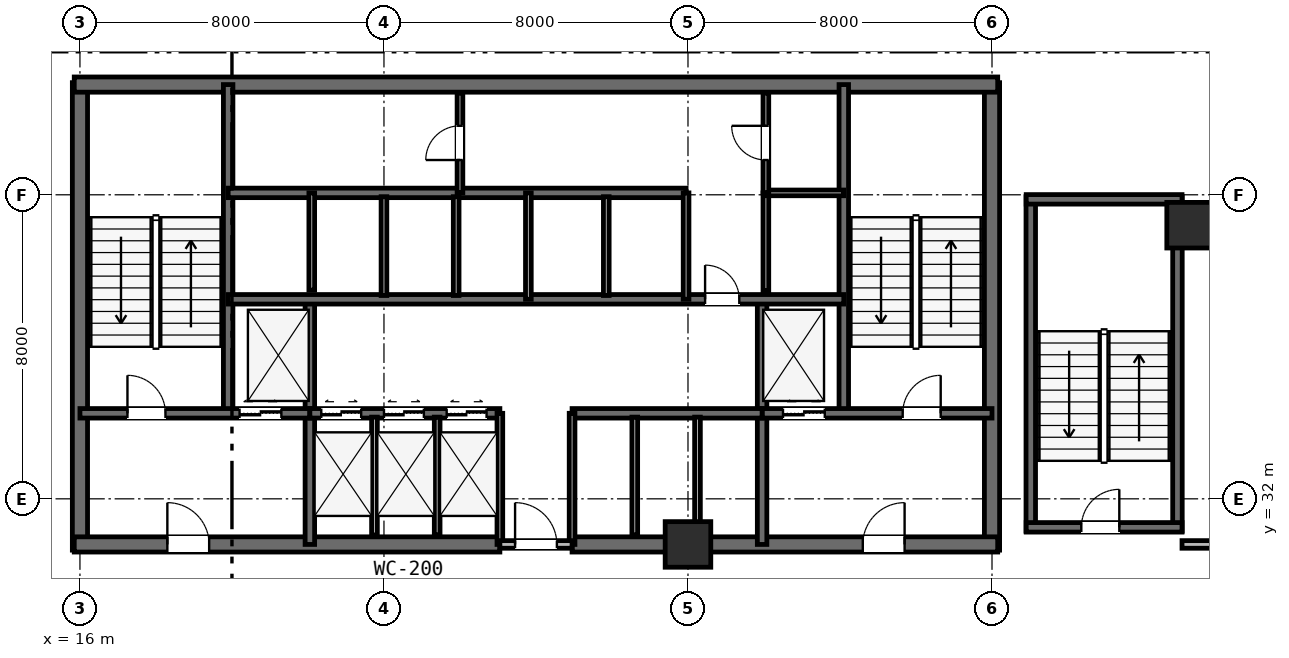
"""IFC4 building model, lengths in metres.
Left out: names, types, materials, properties, quantities, classifications, styles, units other than length and angle.
Written with IfcOpenShell. Run it as: python <this file> out.ifc"""

import sys

from ifc_helpers import new_model, si_unit, direction, frame, frame_2d, origin, origin_2d, place, context, subcontext, project, spatial, rectangle, extrude, element, fill, save


model = new_model("IFC4")
c1 = context("Model", 3, precision=1e-05, world=origin(), true_north=direction((0.0, 1.0)))
c2 = subcontext(c1, "Body", "Model", "MODEL_VIEW")
j1 = project(units=[si_unit("LENGTHUNIT", "METRE"), si_unit("PLANEANGLEUNIT", "RADIAN")], contexts=[c1])
p1 = place(None, origin())
s1 = spatial("IfcSite", under=j1, at=p1, CompositionType="ELEMENT")
p2 = place(p1, origin())
s2 = spatial("IfcBuilding", under=s1, at=p2, CompositionType="ELEMENT")
p3 = place(p2, frame((0.0, 0.0, -13.2)))
s3 = spatial("IfcBuildingStorey", under=s2, at=p3, CompositionType="ELEMENT", Elevation=-13.2)
for number, where, z_axis, x_axis in (
    (1, (16.0, 30.65, 0.0), (0.0, 0.0, 1.0), (0.0, 1.0, 0.0)),
    (2, (40.0, 30.65, 0.0), (0.0, 0.0, 1.0), (0.0, 1.0, 0.0)),
):
    element("IfcWall", number, at=place(p3, frame(where, z_axis=z_axis, x_axis=x_axis)), inside=s3, PredefinedType="SHEAR", context=c2, shape_type="SweptSolid", body=[
        extrude(rectangle(XDim=12.3, YDim=0.4, at=frame_2d((6.15, 0.0))), origin(), (0.0, 0.0, 1.0), 3.8),
    ])
p4 = place(p3, frame((15.85, 42.9, 0.0), z_axis=(0.0, 0.0, 1.0), x_axis=(1.0, 0.0, 0.0)))
e3 = element("IfcWall", 3, at=p4, inside=s3, PredefinedType="SHEAR", context=c2, shape_type="SweptSolid", body=[
    extrude(rectangle(XDim=24.3, YDim=0.4, at=frame_2d((12.15, 0.0))), origin(), (0.0, 0.0, 1.0), 3.8),
])
p5 = place(p3, frame((15.85, 30.8, 0.0), z_axis=(0.0, 0.0, 1.0), x_axis=(1.0, 0.0, 0.0)))
e4 = element("IfcWall", 4, at=p5, inside=s3, PredefinedType="SHEAR", context=c2, shape_type="SweptSolid", body=[
    extrude(rectangle(XDim=11.2, YDim=0.4, at=frame_2d((5.6, 0.0))), origin(), (0.0, 0.0, 1.0), 3.8),
])
p6 = place(p5, frame((2.45, 0.0, 0.0)))
e5 = element("IfcOpeningElement", 5, at=p6, cuts=e4, PredefinedType="OPENING", context=c2, shape_type="SweptSolid", body=[
    extrude(rectangle(XDim=1.1, YDim=2.15, at=frame_2d((0.55, 1.075))), frame((0.0, 0.21, 0.0), z_axis=(0.0, -1.0, 0.0), x_axis=(1.0, 0.0, 0.0)), (0.0, 0.0, 1.0), 0.42),
])
p7 = place(p3, frame((28.95, 30.8, 0.0), z_axis=(0.0, 0.0, 1.0), x_axis=(1.0, 0.0, 0.0)))
e6 = element("IfcWall", 6, at=p7, inside=s3, PredefinedType="SHEAR", context=c2, shape_type="SweptSolid", body=[
    extrude(rectangle(XDim=11.2, YDim=0.4, at=frame_2d((5.6, 0.0))), origin(), (0.0, 0.0, 1.0), 3.8),
])
p8 = place(p7, frame((7.65, 0.0, 0.0)))
e7 = element("IfcOpeningElement", 7, at=p8, cuts=e6, PredefinedType="OPENING", context=c2, shape_type="SweptSolid", body=[
    extrude(rectangle(XDim=1.1, YDim=2.15, at=frame_2d((0.55, 1.075))), frame((0.0, 0.21, 0.0), z_axis=(0.0, -1.0, 0.0), x_axis=(1.0, 0.0, 0.0)), (0.0, 0.0, 1.0), 0.42),
])
for number, where, z_axis, x_axis in (
    (8, (19.9, 34.25, 0.0), (0.0, 0.0, 1.0), (0.0, 1.0, 0.0)),
    (9, (36.1, 34.25, 0.0), (0.0, 0.0, 1.0), (0.0, 1.0, 0.0)),
):
    element("IfcWall", number, at=place(p3, frame(where, z_axis=z_axis, x_axis=x_axis)), inside=s3, PredefinedType="SHEAR", context=c2, shape_type="SweptSolid", body=[
        extrude(rectangle(XDim=8.65, YDim=0.25, at=frame_2d((4.325, 0.0))), origin(), (0.0, 0.0, 1.0), 3.8),
    ])
for number, where, z_axis, x_axis in (
    (10, (22.05, 30.8, 0.0), (0.0, 0.0, 1.0), (0.0, 1.0, 0.0)),
    (11, (33.95, 30.8, 0.0), (0.0, 0.0, 1.0), (0.0, 1.0, 0.0)),
):
    element("IfcWall", number, at=place(p3, frame(where, z_axis=z_axis, x_axis=x_axis)), inside=s3, PredefinedType="SHEAR", context=c2, shape_type="SweptSolid", body=[
        extrude(rectangle(XDim=6.45, YDim=0.25, at=frame_2d((3.225, 0.0))), origin(), (0.0, 0.0, 1.0), 3.8),
    ])
p9 = place(p3, frame((16.0, 34.25, 0.0), z_axis=(0.0, 0.0, 1.0), x_axis=(1.0, 0.0, 0.0)))
e12 = element("IfcWall", 12, at=p9, inside=s3, PredefinedType="SHEAR", context=c2, shape_type="SweptSolid", body=[
    extrude(rectangle(XDim=6.05, YDim=0.25, at=frame_2d((3.025, 0.0))), origin(), (0.0, 0.0, 1.0), 3.8),
])
p10 = place(p9, frame((1.25, 0.0, 0.0)))
e13 = element("IfcOpeningElement", 13, at=p10, cuts=e12, PredefinedType="OPENING", context=c2, shape_type="SweptSolid", body=[
    extrude(rectangle(XDim=1.0, YDim=2.15, at=frame_2d((0.5, 1.075))), frame((0.0, 0.135, 0.0), z_axis=(0.0, -1.0, 0.0), x_axis=(1.0, 0.0, 0.0)), (0.0, 0.0, 1.0), 0.27),
])
p11 = place(p9, frame((4.2, 0.0, 0.0)))
e14 = element("IfcOpeningElement", 14, at=p11, cuts=e12, PredefinedType="OPENING", context=c2, shape_type="SweptSolid", body=[
    extrude(rectangle(XDim=1.1, YDim=2.15, at=frame_2d((0.55, 1.075))), frame((0.0, 0.135, 0.0), z_axis=(0.0, -1.0, 0.0), x_axis=(1.0, 0.0, 0.0)), (0.0, 0.0, 1.0), 0.27),
])
p12 = place(p3, frame((33.95, 34.25, 0.0), z_axis=(0.0, 0.0, 1.0), x_axis=(1.0, 0.0, 0.0)))
e15 = element("IfcWall", 15, at=p12, inside=s3, PredefinedType="SHEAR", context=c2, shape_type="SweptSolid", body=[
    extrude(rectangle(XDim=6.05, YDim=0.25, at=frame_2d((3.025, 0.0))), origin(), (0.0, 0.0, 1.0), 3.8),
])
p13 = place(p12, frame((3.7, 0.0, 0.0)))
e16 = element("IfcOpeningElement", 16, at=p13, cuts=e15, PredefinedType="OPENING", context=c2, shape_type="SweptSolid", body=[
    extrude(rectangle(XDim=1.0, YDim=2.15, at=frame_2d((0.5, 1.075))), frame((0.0, 0.135, 0.0), z_axis=(0.0, -1.0, 0.0), x_axis=(1.0, 0.0, 0.0)), (0.0, 0.0, 1.0), 0.27),
])
p14 = place(p12, frame((0.55, 0.0, 0.0)))
e17 = element("IfcOpeningElement", 17, at=p14, cuts=e15, PredefinedType="OPENING", context=c2, shape_type="SweptSolid", body=[
    extrude(rectangle(XDim=1.1, YDim=2.15, at=frame_2d((0.55, 1.075))), frame((0.0, 0.135, 0.0), z_axis=(0.0, -1.0, 0.0), x_axis=(1.0, 0.0, 0.0)), (0.0, 0.0, 1.0), 0.27),
])
p15 = place(p3, frame((22.05, 34.25, 0.0), z_axis=(0.0, 0.0, 1.0), x_axis=(1.0, 0.0, 0.0)))
e18 = element("IfcWall", 18, at=p15, inside=s3, PredefinedType="SHEAR", context=c2, shape_type="SweptSolid", body=[
    extrude(rectangle(XDim=5.0, YDim=0.25, at=frame_2d((2.5, 0.0))), origin(), (0.0, 0.0, 1.0), 3.8),
])
p16 = place(p15, frame((0.3, 0.0, 0.0)))
e19 = element("IfcOpeningElement", 19, at=p16, cuts=e18, PredefinedType="OPENING", context=c2, shape_type="SweptSolid", body=[
    extrude(rectangle(XDim=1.05, YDim=2.15, at=frame_2d((0.525, 1.075))), frame((0.0, 0.135, 0.0), z_axis=(0.0, -1.0, 0.0), x_axis=(1.0, 0.0, 0.0)), (0.0, 0.0, 1.0), 0.27),
])
p17 = place(p15, frame((1.95, 0.0, 0.0)))
e20 = element("IfcOpeningElement", 20, at=p17, cuts=e18, PredefinedType="OPENING", context=c2, shape_type="SweptSolid", body=[
    extrude(rectangle(XDim=1.05, YDim=2.15, at=frame_2d((0.525, 1.075))), frame((0.0, 0.135, 0.0), z_axis=(0.0, -1.0, 0.0), x_axis=(1.0, 0.0, 0.0)), (0.0, 0.0, 1.0), 0.27),
])
p18 = place(p15, frame((3.6, 0.0, 0.0)))
e21 = element("IfcOpeningElement", 21, at=p18, cuts=e18, PredefinedType="OPENING", context=c2, shape_type="SweptSolid", body=[
    extrude(rectangle(XDim=1.05, YDim=2.15, at=frame_2d((0.525, 1.075))), frame((0.0, 0.135, 0.0), z_axis=(0.0, -1.0, 0.0), x_axis=(1.0, 0.0, 0.0)), (0.0, 0.0, 1.0), 0.27),
])
p19 = place(p3, frame((28.95, 34.25, 0.0), z_axis=(0.0, 0.0, 1.0), x_axis=(1.0, 0.0, 0.0)))
e22 = element("IfcWall", 22, at=p19, inside=s3, PredefinedType="SHEAR", context=c2, shape_type="SweptSolid", body=[
    extrude(rectangle(XDim=5.0, YDim=0.25, at=frame_2d((2.5, 0.0))), origin(), (0.0, 0.0, 1.0), 3.8),
])
p20 = place(p3, frame((19.9, 37.25, 0.0), z_axis=(0.0, 0.0, 1.0), x_axis=(1.0, 0.0, 0.0)))
e23 = element("IfcWall", 23, at=p20, inside=s3, PredefinedType="SHEAR", context=c2, shape_type="SweptSolid", body=[
    extrude(rectangle(XDim=16.2, YDim=0.25, at=frame_2d((8.1, 0.0))), origin(), (0.0, 0.0, 1.0), 3.8),
])
p21 = place(p20, frame((12.55, 0.0, 0.0)))
e24 = element("IfcOpeningElement", 24, at=p21, cuts=e23, PredefinedType="OPENING", context=c2, shape_type="SweptSolid", body=[
    extrude(rectangle(XDim=0.9, YDim=2.15, at=frame_2d((0.45, 1.075))), frame((0.0, 0.135, 0.0), z_axis=(0.0, -1.0, 0.0), x_axis=(1.0, 0.0, 0.0)), (0.0, 0.0, 1.0), 0.27),
])
p22 = place(p3, frame((19.9, 40.05, 0.0), z_axis=(0.0, 0.0, 1.0), x_axis=(1.0, 0.0, 0.0)))
e25 = element("IfcWall", 25, at=p22, inside=s3, PredefinedType="SHEAR", context=c2, shape_type="SweptSolid", body=[
    extrude(rectangle(XDim=12.05, YDim=0.25, at=frame_2d((6.025, 0.0))), origin(), (0.0, 0.0, 1.0), 3.8),
])
for number, where, z_axis, x_axis in (
    (26, (41.02, 31.15, 0.0), (0.0, 0.0, 1.0), (0.0, 1.0, 0.0)),
    (27, (44.88, 31.15, 0.0), (0.0, 0.0, 1.0), (0.0, 1.0, 0.0)),
):
    element("IfcWall", number, at=place(p3, frame(where, z_axis=z_axis, x_axis=x_axis)), inside=s3, PredefinedType="SHEAR", context=c2, shape_type="SweptSolid", body=[
        extrude(rectangle(XDim=8.8, YDim=0.25, at=frame_2d((4.4, 0.0))), origin(), (0.0, 0.0, 1.0), 3.8),
    ])
p23 = place(p3, frame((40.9, 39.88, 0.0), z_axis=(0.0, 0.0, 1.0), x_axis=(1.0, 0.0, 0.0)))
e28 = element("IfcWall", 28, at=p23, inside=s3, PredefinedType="SHEAR", context=c2, shape_type="SweptSolid", body=[
    extrude(rectangle(XDim=4.1, YDim=0.25, at=frame_2d((2.05, 0.0))), origin(), (0.0, 0.0, 1.0), 3.8),
])
p24 = place(p3, frame((40.9, 31.25, 0.0), z_axis=(0.0, 0.0, 1.0), x_axis=(1.0, 0.0, 0.0)))
e29 = element("IfcWall", 29, at=p24, inside=s3, PredefinedType="SHEAR", context=c2, shape_type="SweptSolid", body=[
    extrude(rectangle(XDim=4.1, YDim=0.25, at=frame_2d((2.05, 0.0))), origin(), (0.0, 0.0, 1.0), 3.8),
])
p25 = place(p24, frame((1.45, 0.0, 0.0)))
e30 = element("IfcOpeningElement", 30, at=p25, cuts=e29, PredefinedType="OPENING", context=c2, shape_type="SweptSolid", body=[
    extrude(rectangle(XDim=1.0, YDim=2.15, at=frame_2d((0.5, 1.075))), frame((0.0, 0.135, 0.0), z_axis=(0.0, -1.0, 0.0), x_axis=(1.0, 0.0, 0.0)), (0.0, 0.0, 1.0), 0.27),
])
for number, where, z_axis, x_axis in (
    (31, (45.2, 39.2, 0.0), (0.0, 0.0, 1.0), (1.0, 0.0, 0.0)),
    (32, (32.0, 30.8, 0.0), (0.0, 0.0, 1.0), (1.0, 0.0, 0.0)),
):
    element("IfcColumn", number, at=place(p3, frame(where, z_axis=z_axis, x_axis=x_axis)), inside=s3, PredefinedType="COLUMN", context=c2, shape_type="SweptSolid", body=[
        extrude(rectangle(XDim=1.2, YDim=1.2, at=origin_2d()), origin(), (0.0, 0.0, 1.0), 3.8),
    ])
for number, where, z_axis, x_axis in (
    (33, (27.05, 30.8, 0.0), (0.0, 0.0, 1.0), (0.0, 1.0, 0.0)),
    (34, (28.95, 30.8, 0.0), (0.0, 0.0, 1.0), (0.0, 1.0, 0.0)),
):
    element("IfcWall", number, at=place(p3, frame(where, z_axis=z_axis, x_axis=x_axis)), inside=s3, PredefinedType="PLUMBINGWALL", context=c2, shape_type="SweptSolid", body=[
        extrude(rectangle(XDim=3.45, YDim=0.15, at=frame_2d((1.725, 0.0))), origin(), (0.0, 0.0, 1.0), 3.49),
    ])
p26 = place(p3, frame((27.05, 30.8, 0.0), z_axis=(0.0, 0.0, 1.0), x_axis=(1.0, 0.0, 0.0)))
e35 = element("IfcWall", 35, at=p26, inside=s3, PredefinedType="PARTITIONING", context=c2, shape_type="SweptSolid", body=[
    extrude(rectangle(XDim=1.9, YDim=0.2, at=frame_2d((0.95, 0.0))), origin(), (0.0, 0.0, 1.0), 3.49),
])
p27 = place(p26, frame((0.4, 0.0, 0.0)))
e36 = element("IfcOpeningElement", 36, at=p27, cuts=e35, PredefinedType="OPENING", context=c2, shape_type="SweptSolid", body=[
    extrude(rectangle(XDim=1.1, YDim=2.15, at=frame_2d((0.55, 1.075))), frame((0.0, 0.11, 0.0), z_axis=(0.0, -1.0, 0.0), x_axis=(1.0, 0.0, 0.0)), (0.0, 0.0, 1.0), 0.22),
])
for number, where, z_axis, x_axis in (
    (37, (23.75, 31.05, 0.0), (0.0, 0.0, 1.0), (0.0, 1.0, 0.0)),
    (38, (25.4, 31.05, 0.0), (0.0, 0.0, 1.0), (0.0, 1.0, 0.0)),
    (39, (30.6, 31.05, 0.0), (0.0, 0.0, 1.0), (0.0, 1.0, 0.0)),
):
    element("IfcWall", number, at=place(p3, frame(where, z_axis=z_axis, x_axis=x_axis)), inside=s3, PredefinedType="PLUMBINGWALL", context=c2, shape_type="SweptSolid", body=[
        extrude(rectangle(XDim=3.1, YDim=0.15, at=frame_2d((1.55, 0.0))), origin(), (0.0, 0.0, 1.0), 3.49),
    ])
p28 = place(p3, frame((32.25, 31.05, 0.0), z_axis=(0.0, 0.0, 1.0), x_axis=(0.0, 1.0, 0.0)))
e40 = element("IfcWall", 40, at=p28, inside=s3, PredefinedType="PLUMBINGWALL", context=c2, shape_type="SweptSolid", body=[
    extrude(rectangle(XDim=3.1, YDim=0.15, at=frame_2d((1.55, 0.0))), origin(), (0.0, 0.0, 1.0), 2.88),
])
p29 = place(p3, frame((22.1, 37.49, 0.0), z_axis=(0.0, 0.0, 1.0), x_axis=(0.0, 1.0, 0.0)))
e41 = element("IfcWall", 41, at=p29, inside=s3, PredefinedType="PLUMBINGWALL", context=c2, shape_type="SweptSolid", body=[
    extrude(rectangle(XDim=2.56, YDim=0.15, at=frame_2d((1.28, 0.0))), origin(), (0.0, 0.0, 1.0), 3.49),
])
p30 = place(p3, frame((27.8, 37.25, 0.0), z_axis=(0.0, 0.0, 1.0), x_axis=(0.0, 1.0, 0.0)))
e42 = element("IfcWall", 42, at=p30, inside=s3, PredefinedType="PLUMBINGWALL", context=c2, shape_type="SweptSolid", body=[
    extrude(rectangle(XDim=2.8, YDim=0.15, at=frame_2d((1.4, 0.0))), origin(), (0.0, 0.0, 1.0), 3.49),
])
for number, where, z_axis, x_axis in (
    (43, (24.0, 37.35, 0.0), (0.0, 0.0, 1.0), (0.0, 1.0, 0.0)),
    (44, (25.9, 37.35, 0.0), (0.0, 0.0, 1.0), (0.0, 1.0, 0.0)),
):
    element("IfcWall", number, at=place(p3, frame(where, z_axis=z_axis, x_axis=x_axis)), inside=s3, PredefinedType="PLUMBINGWALL", context=c2, shape_type="SweptSolid", body=[
        extrude(rectangle(XDim=2.6, YDim=0.15, at=frame_2d((1.3, 0.0))), origin(), (0.0, 0.0, 1.0), 3.49),
    ])
p31 = place(p3, frame((31.95, 37.25, 0.0), z_axis=(0.0, 0.0, 1.0), x_axis=(0.0, 1.0, 0.0)))
e45 = element("IfcWall", 45, at=p31, inside=s3, PredefinedType="PLUMBINGWALL", context=c2, shape_type="SweptSolid", body=[
    extrude(rectangle(XDim=2.8, YDim=0.15, at=frame_2d((1.4, 0.0))), origin(), (0.0, 0.0, 1.0), 3.49),
])
p32 = place(p3, frame((29.85, 37.35, 0.0), z_axis=(0.0, 0.0, 1.0), x_axis=(0.0, 1.0, 0.0)))
e46 = element("IfcWall", 46, at=p32, inside=s3, PredefinedType="PLUMBINGWALL", context=c2, shape_type="SweptSolid", body=[
    extrude(rectangle(XDim=2.6, YDim=0.15, at=frame_2d((1.3, 0.0))), origin(), (0.0, 0.0, 1.0), 3.49),
])
p33 = place(p3, frame((34.05, 37.473, 0.0), z_axis=(0.0, 0.0, 1.0), x_axis=(0.0, 1.0, 0.0)))
e47 = element("IfcWall", 47, at=p33, inside=s3, PredefinedType="PLUMBINGWALL", context=c2, shape_type="SweptSolid", body=[
    extrude(rectangle(XDim=2.577, YDim=0.15, at=frame_2d((1.288, 0.0))), origin(), (0.0, 0.0, 1.0), 3.49),
])
p34 = place(p3, frame((34.05, 40.05, 0.0), z_axis=(0.0, 0.0, 1.0), x_axis=(1.0, 0.0, 0.0)))
e48 = element("IfcWall", 48, at=p34, inside=s3, PredefinedType="PARTITIONING", context=c2, shape_type="SweptSolid", body=[
    extrude(rectangle(XDim=2.05, YDim=0.15, at=frame_2d((1.025, 0.0))), origin(), (0.0, 0.0, 1.0), 3.49),
])
p35 = place(p3, frame((34.05, 40.05, 0.0), z_axis=(0.0, 0.0, 1.0), x_axis=(0.0, 1.0, 0.0)))
e49 = element("IfcWall", 49, at=p35, inside=s3, PredefinedType="PARTITIONING", context=c2, shape_type="SweptSolid", body=[
    extrude(rectangle(XDim=2.63, YDim=0.15, at=frame_2d((1.315, 0.0))), origin(), (0.0, 0.0, 1.0), 3.49),
])
p36 = place(p35, frame((0.865, 0.0, 0.0)))
e50 = element("IfcOpeningElement", 50, at=p36, cuts=e49, PredefinedType="OPENING", context=c2, shape_type="SweptSolid", body=[
    extrude(rectangle(XDim=0.9, YDim=2.15, at=frame_2d((0.45, 1.075))), frame((0.0, 0.085, 0.0), z_axis=(0.0, -1.0, 0.0), x_axis=(1.0, 0.0, 0.0)), (0.0, 0.0, 1.0), 0.17),
])
p37 = place(p3, frame((26.0, 40.05, 0.0), z_axis=(0.0, 0.0, 1.0), x_axis=(0.0, 1.0, 0.0)))
e51 = element("IfcWall", 51, at=p37, inside=s3, PredefinedType="PARTITIONING", context=c2, shape_type="SweptSolid", body=[
    extrude(rectangle(XDim=2.63, YDim=0.15, at=frame_2d((1.315, 0.0))), origin(), (0.0, 0.0, 1.0), 3.49),
])
p38 = place(p37, frame((0.865, 0.0, 0.0)))
e52 = element("IfcOpeningElement", 52, at=p38, cuts=e51, PredefinedType="OPENING", context=c2, shape_type="SweptSolid", body=[
    extrude(rectangle(XDim=0.9, YDim=2.15, at=frame_2d((0.45, 1.075))), frame((0.0, 0.085, 0.0), z_axis=(0.0, -1.0, 0.0), x_axis=(1.0, 0.0, 0.0)), (0.0, 0.0, 1.0), 0.17),
])
p39 = place(p3, frame((45.0, 30.8, 0.0), z_axis=(0.0, 0.0, 1.0), x_axis=(1.0, 0.0, 0.0)))
e53 = element("IfcWall", 53, at=p39, inside=s3, PredefinedType="PARTITIONING", context=c2, shape_type="SweptSolid", body=[
    extrude(rectangle(XDim=10.45, YDim=0.2, at=frame_2d((5.225, 0.0))), origin(), (0.0, 0.0, 1.0), 2.88),
])
p40 = place(p27, origin())
e54 = element("IfcDoor", 54, at=p40, inside=s3, OperationType="SINGLE_SWING_LEFT", PredefinedType="DOOR", context=c2, shape_type="SweptSolid", body=[
    extrude(rectangle(XDim=1.1, YDim=2.15, at=frame_2d((0.55, 1.075))), frame((0.0, 0.025, 0.0), z_axis=(0.0, -1.0, 0.0), x_axis=(1.0, 0.0, 0.0)), (0.0, 0.0, 1.0), 0.05),
])
fill(e36, e54)
p41 = place(p10, origin())
e55 = element("IfcDoor", 55, at=p41, inside=s3, OperationType="SINGLE_SWING_LEFT", PredefinedType="DOOR", context=c2, shape_type="SweptSolid", body=[
    extrude(rectangle(XDim=1.0, YDim=2.15, at=frame_2d((0.5, 1.075))), frame((0.0, 0.025, 0.0), z_axis=(0.0, -1.0, 0.0), x_axis=(1.0, 0.0, 0.0)), (0.0, 0.0, 1.0), 0.05),
])
fill(e13, e55)
p42 = place(p13, origin())
e56 = element("IfcDoor", 56, at=p42, inside=s3, OperationType="SINGLE_SWING_RIGHT", PredefinedType="DOOR", context=c2, shape_type="SweptSolid", body=[
    extrude(rectangle(XDim=1.0, YDim=2.15, at=frame_2d((0.5, 1.075))), frame((0.0, 0.025, 0.0), z_axis=(0.0, -1.0, 0.0), x_axis=(1.0, 0.0, 0.0)), (0.0, 0.0, 1.0), 0.05),
])
fill(e16, e56)
p43 = place(p6, origin())
e57 = element("IfcDoor", 57, at=p43, inside=s3, OperationType="SINGLE_SWING_LEFT", PredefinedType="DOOR", context=c2, shape_type="SweptSolid", body=[
    extrude(rectangle(XDim=1.1, YDim=2.15, at=frame_2d((0.55, 1.075))), frame((0.0, 0.025, 0.0), z_axis=(0.0, -1.0, 0.0), x_axis=(1.0, 0.0, 0.0)), (0.0, 0.0, 1.0), 0.05),
])
fill(e5, e57)
p44 = place(p8, origin())
e58 = element("IfcDoor", 58, at=p44, inside=s3, OperationType="SINGLE_SWING_RIGHT", PredefinedType="DOOR", context=c2, shape_type="SweptSolid", body=[
    extrude(rectangle(XDim=1.1, YDim=2.15, at=frame_2d((0.55, 1.075))), frame((0.0, 0.025, 0.0), z_axis=(0.0, -1.0, 0.0), x_axis=(1.0, 0.0, 0.0)), (0.0, 0.0, 1.0), 0.05),
])
fill(e7, e58)
p45 = place(p25, origin())
e59 = element("IfcDoor", 59, at=p45, inside=s3, OperationType="SINGLE_SWING_RIGHT", PredefinedType="DOOR", context=c2, shape_type="SweptSolid", body=[
    extrude(rectangle(XDim=1.0, YDim=2.15, at=frame_2d((0.5, 1.075))), frame((0.0, 0.025, 0.0), z_axis=(0.0, -1.0, 0.0), x_axis=(1.0, 0.0, 0.0)), (0.0, 0.0, 1.0), 0.05),
])
fill(e30, e59)
p46 = place(p21, origin())
e60 = element("IfcDoor", 60, at=p46, inside=s3, OperationType="SINGLE_SWING_LEFT", PredefinedType="DOOR", context=c2, shape_type="SweptSolid", body=[
    extrude(rectangle(XDim=0.9, YDim=2.15, at=frame_2d((0.45, 1.075))), frame((0.0, 0.025, 0.0), z_axis=(0.0, -1.0, 0.0), x_axis=(1.0, 0.0, 0.0)), (0.0, 0.0, 1.0), 0.05),
])
fill(e24, e60)
p47 = place(p36, origin())
e61 = element("IfcDoor", 61, at=p47, inside=s3, OperationType="SINGLE_SWING_RIGHT", PredefinedType="DOOR", context=c2, shape_type="SweptSolid", body=[
    extrude(rectangle(XDim=0.9, YDim=2.15, at=frame_2d((0.45, 1.075))), frame((0.0, 0.025, 0.0), z_axis=(0.0, -1.0, 0.0), x_axis=(1.0, 0.0, 0.0)), (0.0, 0.0, 1.0), 0.05),
])
fill(e50, e61)
p48 = place(p38, origin())
e62 = element("IfcDoor", 62, at=p48, inside=s3, OperationType="SINGLE_SWING_LEFT", PredefinedType="DOOR", context=c2, shape_type="SweptSolid", body=[
    extrude(rectangle(XDim=0.9, YDim=2.15, at=frame_2d((0.45, 1.075))), frame((0.0, 0.025, 0.0), z_axis=(0.0, -1.0, 0.0), x_axis=(1.0, 0.0, 0.0)), (0.0, 0.0, 1.0), 0.05),
])
fill(e52, e62)
p49 = place(p11, origin())
e63 = element("IfcDoor", 63, at=p49, inside=s3, OperationType="DOUBLE_DOOR_SLIDING", PredefinedType="DOOR", context=c2, shape_type="SweptSolid", body=[
    extrude(rectangle(XDim=1.1, YDim=2.15, at=frame_2d((0.55, 1.075))), frame((0.0, 0.025, 0.0), z_axis=(0.0, -1.0, 0.0), x_axis=(1.0, 0.0, 0.0)), (0.0, 0.0, 1.0), 0.05),
])
fill(e14, e63)
p50 = place(p14, origin())
e64 = element("IfcDoor", 64, at=p50, inside=s3, OperationType="DOUBLE_DOOR_SLIDING", PredefinedType="DOOR", context=c2, shape_type="SweptSolid", body=[
    extrude(rectangle(XDim=1.1, YDim=2.15, at=frame_2d((0.55, 1.075))), frame((0.0, 0.025, 0.0), z_axis=(0.0, -1.0, 0.0), x_axis=(1.0, 0.0, 0.0)), (0.0, 0.0, 1.0), 0.05),
])
fill(e17, e64)
p51 = place(p16, origin())
e65 = element("IfcDoor", 65, at=p51, inside=s3, OperationType="DOUBLE_DOOR_SLIDING", PredefinedType="DOOR", context=c2, shape_type="SweptSolid", body=[
    extrude(rectangle(XDim=1.05, YDim=2.15, at=frame_2d((0.525, 1.075))), frame((0.0, 0.025, 0.0), z_axis=(0.0, -1.0, 0.0), x_axis=(1.0, 0.0, 0.0)), (0.0, 0.0, 1.0), 0.05),
])
fill(e19, e65)
p52 = place(p17, origin())
e66 = element("IfcDoor", 66, at=p52, inside=s3, OperationType="DOUBLE_DOOR_SLIDING", PredefinedType="DOOR", context=c2, shape_type="SweptSolid", body=[
    extrude(rectangle(XDim=1.05, YDim=2.15, at=frame_2d((0.525, 1.075))), frame((0.0, 0.025, 0.0), z_axis=(0.0, -1.0, 0.0), x_axis=(1.0, 0.0, 0.0)), (0.0, 0.0, 1.0), 0.05),
])
fill(e20, e66)
p53 = place(p18, origin())
e67 = element("IfcDoor", 67, at=p53, inside=s3, OperationType="DOUBLE_DOOR_SLIDING", PredefinedType="DOOR", context=c2, shape_type="SweptSolid", body=[
    extrude(rectangle(XDim=1.05, YDim=2.15, at=frame_2d((0.525, 1.075))), frame((0.0, 0.025, 0.0), z_axis=(0.0, -1.0, 0.0), x_axis=(1.0, 0.0, 0.0)), (0.0, 0.0, 1.0), 0.05),
])
fill(e21, e67)
save(model, sys.argv[1])
